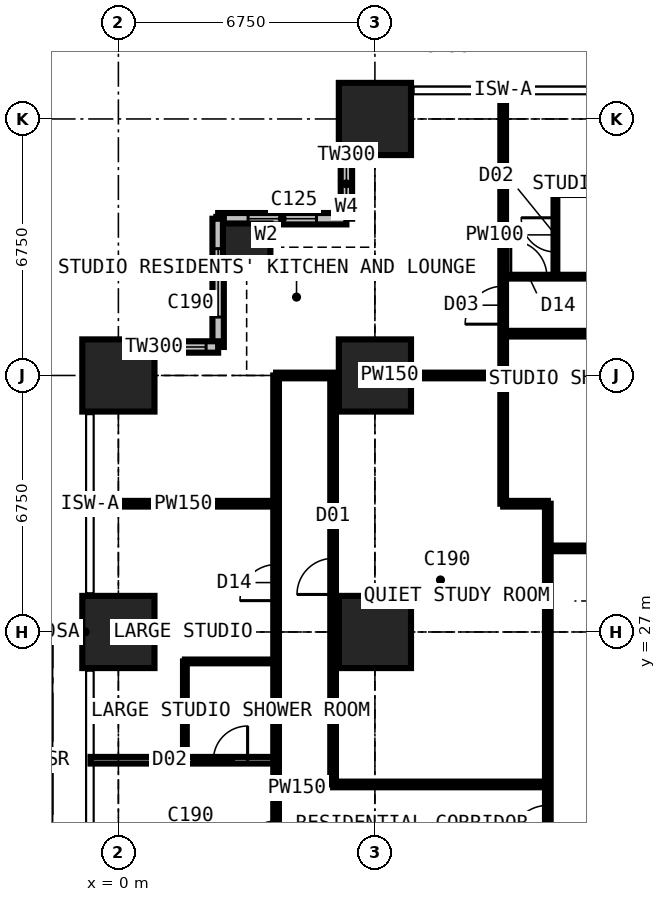
"""IFC4 building model, lengths in metres.
Left out: names, types, materials, properties, quantities, classifications, styles, units other than length and angle.
Written with IfcOpenShell. Run it as: python <this file> out.ifc"""

import sys

from ifc_helpers import new_model, si_unit, direction, frame, frame_2d, origin, origin_2d, place, context, subcontext, project, spatial, rectangle, extrude, element, fill, save


model = new_model("IFC4")
c1 = context("Model", 3, precision=1e-05, world=origin(), true_north=direction((0.0, 1.0)))
c2 = subcontext(c1, "Body", "Model", "MODEL_VIEW")
j1 = project(units=[si_unit("LENGTHUNIT", "METRE"), si_unit("PLANEANGLEUNIT", "RADIAN")], contexts=[c1])
p1 = place(None, origin())
s1 = spatial("IfcSite", under=j1, at=p1, CompositionType="ELEMENT")
p2 = place(p1, origin())
s2 = spatial("IfcBuilding", under=s1, at=p2, CompositionType="ELEMENT")
p3 = place(p2, frame((0.0, 0.0, 18.0)))
s3 = spatial("IfcBuildingStorey", under=s2, at=p3, CompositionType="ELEMENT", Elevation=18.0)
for number, where, z_axis, x_axis in (
    (1, (0.0, 27.0, 0.0), (0.0, 0.0, 1.0), (1.0, 0.0, 0.0)),
    (2, (0.0, 33.75, 0.0), (0.0, 0.0, 1.0), (1.0, 0.0, 0.0)),
):
    element("IfcColumn", number, at=place(p3, frame(where, z_axis=z_axis, x_axis=x_axis)), inside=s3, PredefinedType="COLUMN", context=c2, shape_type="SweptSolid", body=[
        extrude(rectangle(XDim=1.9, YDim=1.9, at=origin_2d()), origin(), (0.0, 0.0, 1.0), 3.6),
    ])
p4 = place(p3, frame((3.375, 37.125, 0.0), z_axis=(0.0, 0.0, 1.0), x_axis=(1.0, 0.0, 0.0)))
e3 = element("IfcColumn", 3, at=p4, inside=s3, PredefinedType="COLUMN", context=c2, shape_type="SweptSolid", body=[
    extrude(rectangle(XDim=1.25, YDim=1.25, at=origin_2d()), origin(), (0.0, 0.0, 1.0), 3.6),
])
for number, where, z_axis, x_axis in (
    (4, (6.75, 27.0, 0.0), (0.0, 0.0, 1.0), (1.0, 0.0, 0.0)),
    (5, (6.75, 33.75, 0.0), (0.0, 0.0, 1.0), (1.0, 0.0, 0.0)),
    (6, (6.75, 40.5, 0.0), (0.0, 0.0, 1.0), (1.0, 0.0, 0.0)),
):
    element("IfcColumn", number, at=place(p3, frame(where, z_axis=z_axis, x_axis=x_axis)), inside=s3, PredefinedType="COLUMN", context=c2, shape_type="SweptSolid", body=[
        extrude(rectangle(XDim=1.9, YDim=1.9, at=origin_2d()), origin(), (0.0, 0.0, 1.0), 3.6),
    ])
p5 = place(p3, frame((6.0, 41.25, 0.0), z_axis=(0.0, 0.0, 1.0), x_axis=(0.0, -1.0, 0.0)))
e7 = element("IfcWall", 7, at=p5, inside=s3, PredefinedType="SOLIDWALL", context=c2, shape_type="SweptSolid", body=[
    extrude(rectangle(XDim=3.375, YDim=0.3, at=frame_2d((1.688, 0.0))), origin(), (0.0, 0.0, 1.0), 3.375),
])
p6 = place(p5, frame((1.857, 0.0, 0.9)))
e8 = element("IfcOpeningElement", 8, at=p6, cuts=e7, PredefinedType="OPENING", context=c2, shape_type="SweptSolid", body=[
    extrude(rectangle(XDim=1.2, YDim=1.8, at=frame_2d((0.6, 0.9))), frame((0.0, 0.16, 0.0), z_axis=(0.0, -1.0, 0.0), x_axis=(1.0, 0.0, 0.0)), (0.0, 0.0, 1.0), 0.32),
])
p7 = place(p3, frame((6.0, 37.875, 0.0), z_axis=(0.0, 0.0, 1.0), x_axis=(-1.0, 0.0, 0.0)))
e9 = element("IfcWall", 9, at=p7, inside=s3, PredefinedType="SOLIDWALL", context=c2, shape_type="SweptSolid", body=[
    extrude(rectangle(XDim=3.375, YDim=0.3, at=frame_2d((1.688, 0.0))), origin(), (0.0, 0.0, 1.0), 3.375),
])
p8 = place(p7, frame((0.788, 0.0, 0.6)))
e10 = element("IfcOpeningElement", 10, at=p8, cuts=e9, PredefinedType="OPENING", context=c2, shape_type="SweptSolid", body=[
    extrude(rectangle(XDim=1.8, YDim=2.1, at=frame_2d((0.9, 1.05))), frame((0.0, 0.16, 0.0), z_axis=(0.0, -1.0, 0.0), x_axis=(1.0, 0.0, 0.0)), (0.0, 0.0, 1.0), 0.32),
])
p9 = place(p3, frame((2.625, 37.875, 0.0), z_axis=(0.0, 0.0, 1.0), x_axis=(0.0, -1.0, 0.0)))
e11 = element("IfcWall", 11, at=p9, inside=s3, PredefinedType="SOLIDWALL", context=c2, shape_type="SweptSolid", body=[
    extrude(rectangle(XDim=3.375, YDim=0.3, at=frame_2d((1.688, 0.0))), origin(), (0.0, 0.0, 1.0), 3.375),
])
p10 = place(p9, frame((0.788, 0.0, 0.6)))
e12 = element("IfcOpeningElement", 12, at=p10, cuts=e11, PredefinedType="OPENING", context=c2, shape_type="SweptSolid", body=[
    extrude(rectangle(XDim=1.8, YDim=2.1, at=frame_2d((0.9, 1.05))), frame((0.0, 0.16, 0.0), z_axis=(0.0, -1.0, 0.0), x_axis=(1.0, 0.0, 0.0)), (0.0, 0.0, 1.0), 0.32),
])
p11 = place(p3, frame((2.625, 34.5, 0.0), z_axis=(0.0, 0.0, 1.0), x_axis=(-1.0, 0.0, 0.0)))
e13 = element("IfcWall", 13, at=p11, inside=s3, PredefinedType="SOLIDWALL", context=c2, shape_type="SweptSolid", body=[
    extrude(rectangle(XDim=3.375, YDim=0.3, at=frame_2d((1.688, 0.0))), origin(), (0.0, 0.0, 1.0), 3.375),
])
p12 = place(p11, frame((0.317, 0.0, 0.9)))
e14 = element("IfcOpeningElement", 14, at=p12, cuts=e13, PredefinedType="OPENING", context=c2, shape_type="SweptSolid", body=[
    extrude(rectangle(XDim=1.2, YDim=1.8, at=frame_2d((0.6, 0.9))), frame((0.0, 0.16, 0.0), z_axis=(0.0, -1.0, 0.0), x_axis=(1.0, 0.0, 0.0)), (0.0, 0.0, 1.0), 0.32),
])
p13 = place(p3, frame((-0.734, 23.625, 0.0), z_axis=(0.0, 0.0, 1.0), x_axis=(1.0, 0.0, 0.0)))
e15 = element("IfcWall", 15, at=p13, inside=s3, PredefinedType="PARTITIONING", context=c2, shape_type="SweptSolid", body=[
    extrude(rectangle(XDim=4.884, YDim=0.175, at=frame_2d((2.442, 0.0))), origin(), (0.0, 0.0, 1.0), 3.375),
])
p14 = place(p13, frame((3.234, 0.0, 0.0)))
e16 = element("IfcOpeningElement", 16, at=p14, cuts=e15, PredefinedType="OPENING", context=c2, shape_type="SweptSolid", body=[
    extrude(rectangle(XDim=0.9, YDim=2.2, at=frame_2d((0.45, 1.1))), frame((0.0, 0.097, 0.0), z_axis=(0.0, -1.0, 0.0), x_axis=(1.0, 0.0, 0.0)), (0.0, 0.0, 1.0), 0.195),
])
p15 = place(p3, frame((-0.734, 30.375, 0.0), z_axis=(0.0, 0.0, 1.0), x_axis=(1.0, 0.0, 0.0)))
e17 = element("IfcWall", 17, at=p15, inside=s3, PredefinedType="PARTITIONING", context=c2, shape_type="SweptSolid", body=[
    extrude(rectangle(XDim=4.884, YDim=0.15, at=frame_2d((2.442, 0.0))), origin(), (0.0, 0.0, 1.0), 3.375),
])
p16 = place(p3, frame((1.75, 23.625, 0.0), z_axis=(0.0, 0.0, 1.0), x_axis=(0.0, 1.0, 0.0)))
e18 = element("IfcWall", 18, at=p16, inside=s3, PredefinedType="PARTITIONING", context=c2, shape_type="SweptSolid", body=[
    extrude(rectangle(XDim=2.6, YDim=0.1, at=frame_2d((1.3, 0.0))), origin(), (0.0, 0.0, 1.0), 3.375),
])
p17 = place(p3, frame((1.75, 26.225, 0.0), z_axis=(0.0, 0.0, 1.0), x_axis=(1.0, 0.0, 0.0)))
e19 = element("IfcWall", 19, at=p17, inside=s3, PredefinedType="PARTITIONING", context=c2, shape_type="SweptSolid", body=[
    extrude(rectangle(XDim=2.4, YDim=0.1, at=frame_2d((1.2, 0.0))), origin(), (0.0, 0.0, 1.0), 3.375),
])
p18 = place(p3, frame((4.15, 10.125, 0.0), z_axis=(0.0, 0.0, 1.0), x_axis=(0.0, 1.0, 0.0)))
e20 = element("IfcWall", 20, at=p18, inside=s3, PredefinedType="PARTITIONING", context=c2, shape_type="SweptSolid", body=[
    extrude(rectangle(XDim=23.625, YDim=0.15, at=frame_2d((11.812, 0.0))), origin(), (0.0, 0.0, 1.0), 3.375),
])
p19 = place(p18, frame((4.2, 0.0, 0.0)))
e21 = element("IfcOpeningElement", 21, at=p19, cuts=e20, PredefinedType="OPENING", context=c2, shape_type="SweptSolid", body=[
    extrude(rectangle(XDim=0.95, YDim=2.2, at=frame_2d((0.475, 1.1))), frame((0.0, 0.085, 0.0), z_axis=(0.0, -1.0, 0.0), x_axis=(1.0, 0.0, 0.0)), (0.0, 0.0, 1.0), 0.17),
])
p20 = place(p18, frame((10.95, 0.0, 0.0)))
e22 = element("IfcOpeningElement", 22, at=p20, cuts=e20, PredefinedType="OPENING", context=c2, shape_type="SweptSolid", body=[
    extrude(rectangle(XDim=0.95, YDim=2.2, at=frame_2d((0.475, 1.1))), frame((0.0, 0.085, 0.0), z_axis=(0.0, -1.0, 0.0), x_axis=(1.0, 0.0, 0.0)), (0.0, 0.0, 1.0), 0.17),
])
p21 = place(p18, frame((17.7, 0.0, 0.0)))
e23 = element("IfcOpeningElement", 23, at=p21, cuts=e20, PredefinedType="OPENING", context=c2, shape_type="SweptSolid", body=[
    extrude(rectangle(XDim=0.95, YDim=2.2, at=frame_2d((0.475, 1.1))), frame((0.0, 0.085, 0.0), z_axis=(0.0, -1.0, 0.0), x_axis=(1.0, 0.0, 0.0)), (0.0, 0.0, 1.0), 0.17),
])
p22 = place(p3, frame((4.15, 33.75, 0.0), z_axis=(0.0, 0.0, 1.0), x_axis=(1.0, 0.0, 0.0)))
e24 = element("IfcWall", 24, at=p22, inside=s3, PredefinedType="PARTITIONING", context=c2, shape_type="SweptSolid", body=[
    extrude(rectangle(XDim=5.975, YDim=0.15, at=frame_2d((2.988, 0.0))), origin(), (0.0, 0.0, 1.0), 2.877),
])
p23 = place(p3, frame((5.65, 22.988, 0.0), z_axis=(0.0, 0.0, 1.0), x_axis=(0.0, 1.0, 0.0)))
e25 = element("IfcWall", 25, at=p23, inside=s3, PredefinedType="PARTITIONING", context=c2, shape_type="SweptSolid", body=[
    extrude(rectangle(XDim=10.762, YDim=0.15, at=frame_2d((5.381, 0.0))), origin(), (0.0, 0.0, 1.0), 3.375),
])
p24 = place(p23, frame((5.0, 0.0, 0.0)))
e26 = element("IfcOpeningElement", 26, at=p24, cuts=e25, PredefinedType="OPENING", context=c2, shape_type="SweptSolid", body=[
    extrude(rectangle(XDim=0.95, YDim=2.2, at=frame_2d((0.475, 1.1))), frame((0.0, 0.085, 0.0), z_axis=(0.0, -1.0, 0.0), x_axis=(1.0, 0.0, 0.0)), (0.0, 0.0, 1.0), 0.17),
])
p25 = place(p3, frame((5.65, 22.988, 0.0), z_axis=(0.0, 0.0, 1.0), x_axis=(1.0, 0.0, 0.0)))
e27 = element("IfcWall", 27, at=p25, inside=s3, PredefinedType="PARTITIONING", context=c2, shape_type="SweptSolid", body=[
    extrude(rectangle(XDim=5.65, YDim=0.15, at=frame_2d((2.825, 0.0))), origin(), (0.0, 0.0, 1.0), 3.375),
])
p26 = place(p3, frame((10.125, 30.375, 0.0), z_axis=(0.0, 0.0, 1.0), x_axis=(0.0, 1.0, 0.0)))
e28 = element("IfcWall", 28, at=p26, inside=s3, PredefinedType="PARTITIONING", context=c2, shape_type="SweptSolid", body=[
    extrude(rectangle(XDim=10.859, YDim=0.15, at=frame_2d((5.429, 0.0))), origin(), (0.0, 0.0, 1.0), 3.375),
])
p27 = place(p26, frame((4.725, 0.0, 0.0)))
e29 = element("IfcOpeningElement", 29, at=p27, cuts=e28, PredefinedType="OPENING", context=c2, shape_type="SweptSolid", body=[
    extrude(rectangle(XDim=1.0, YDim=2.2, at=frame_2d((0.5, 1.1))), frame((0.0, 0.085, 0.0), z_axis=(0.0, -1.0, 0.0), x_axis=(1.0, 0.0, 0.0)), (0.0, 0.0, 1.0), 0.17),
])
p28 = place(p3, frame((10.125, 30.375, 0.0), z_axis=(0.0, 0.0, 1.0), x_axis=(1.0, 0.0, 0.0)))
e30 = element("IfcWall", 30, at=p28, inside=s3, PredefinedType="PARTITIONING", context=c2, shape_type="SweptSolid", body=[
    extrude(rectangle(XDim=1.175, YDim=0.15, at=frame_2d((0.587, 0.0))), origin(), (0.0, 0.0, 1.0), 3.375),
])
p29 = place(p3, frame((10.125, 34.85, 0.0), z_axis=(0.0, 0.0, 1.0), x_axis=(1.0, 0.0, 0.0)))
e31 = element("IfcWall", 31, at=p29, inside=s3, PredefinedType="PARTITIONING", context=c2, shape_type="SweptSolid", body=[
    extrude(rectangle(XDim=10.762, YDim=0.15, at=frame_2d((5.381, 0.0))), origin(), (0.0, 0.0, 1.0), 3.375),
])
p30 = place(p29, frame((4.9, 0.0, 0.0)))
e32 = element("IfcOpeningElement", 32, at=p30, cuts=e31, PredefinedType="OPENING", context=c2, shape_type="SweptSolid", body=[
    extrude(rectangle(XDim=0.95, YDim=2.2, at=frame_2d((0.475, 1.1))), frame((0.0, 0.085, 0.0), z_axis=(0.0, -1.0, 0.0), x_axis=(1.0, 0.0, 0.0)), (0.0, 0.0, 1.0), 0.17),
])
p31 = place(p3, frame((10.125, 36.35, 0.0), z_axis=(0.0, 0.0, 1.0), x_axis=(1.0, 0.0, 0.0)))
e33 = element("IfcWall", 33, at=p31, inside=s3, PredefinedType="PARTITIONING", context=c2, shape_type="SweptSolid", body=[
    extrude(rectangle(XDim=23.625, YDim=0.1, at=frame_2d((11.812, 0.0))), origin(), (0.0, 0.0, 1.0), 3.375),
])
p32 = place(p31, frame((0.2, 0.0, 0.0)))
e34 = element("IfcOpeningElement", 34, at=p32, cuts=e33, PredefinedType="OPENING", context=c2, shape_type="SweptSolid", body=[
    extrude(rectangle(XDim=0.95, YDim=2.2, at=frame_2d((0.475, 1.1))), frame((0.0, 0.06, 0.0), z_axis=(0.0, -1.0, 0.0), x_axis=(1.0, 0.0, 0.0)), (0.0, 0.0, 1.0), 0.12),
])
p33 = place(p31, frame((3.625, 0.0, 0.0)))
e35 = element("IfcOpeningElement", 35, at=p33, cuts=e33, PredefinedType="OPENING", context=c2, shape_type="SweptSolid", body=[
    extrude(rectangle(XDim=0.95, YDim=2.2, at=frame_2d((0.475, 1.1))), frame((0.0, 0.06, 0.0), z_axis=(0.0, -1.0, 0.0), x_axis=(1.0, 0.0, 0.0)), (0.0, 0.0, 1.0), 0.12),
])
p34 = place(p31, frame((7.0, 0.0, 0.0)))
e36 = element("IfcOpeningElement", 36, at=p34, cuts=e33, PredefinedType="OPENING", context=c2, shape_type="SweptSolid", body=[
    extrude(rectangle(XDim=0.95, YDim=2.2, at=frame_2d((0.475, 1.1))), frame((0.0, 0.06, 0.0), z_axis=(0.0, -1.0, 0.0), x_axis=(1.0, 0.0, 0.0)), (0.0, 0.0, 1.0), 0.12),
])
p35 = place(p31, frame((10.375, 0.0, 0.0)))
e37 = element("IfcOpeningElement", 37, at=p35, cuts=e33, PredefinedType="OPENING", context=c2, shape_type="SweptSolid", body=[
    extrude(rectangle(XDim=0.95, YDim=2.2, at=frame_2d((0.475, 1.1))), frame((0.0, 0.06, 0.0), z_axis=(0.0, -1.0, 0.0), x_axis=(1.0, 0.0, 0.0)), (0.0, 0.0, 1.0), 0.12),
])
p36 = place(p31, frame((13.75, 0.0, 0.0)))
e38 = element("IfcOpeningElement", 38, at=p36, cuts=e33, PredefinedType="OPENING", context=c2, shape_type="SweptSolid", body=[
    extrude(rectangle(XDim=0.95, YDim=2.2, at=frame_2d((0.475, 1.1))), frame((0.0, 0.06, 0.0), z_axis=(0.0, -1.0, 0.0), x_axis=(1.0, 0.0, 0.0)), (0.0, 0.0, 1.0), 0.12),
])
p37 = place(p3, frame((11.3, 11.3, 0.0), z_axis=(0.0, 0.0, 1.0), x_axis=(0.0, 1.0, 0.0)))
e39 = element("IfcWall", 39, at=p37, inside=s3, PredefinedType="PARTITIONING", context=c2, shape_type="SweptSolid", body=[
    extrude(rectangle(XDim=19.075, YDim=0.15, at=frame_2d((9.538, 0.0))), origin(), (0.0, 0.0, 1.0), 3.375),
])
p38 = place(p37, frame((10.137, 0.0, 0.0)))
e40 = element("IfcOpeningElement", 40, at=p38, cuts=e39, PredefinedType="OPENING", context=c2, shape_type="SweptSolid", body=[
    extrude(rectangle(XDim=1.0, YDim=2.2, at=frame_2d((0.5, 1.1))), frame((0.0, 0.085, 0.0), z_axis=(0.0, -1.0, 0.0), x_axis=(1.0, 0.0, 0.0)), (0.0, 0.0, 1.0), 0.17),
])
p39 = place(p3, frame((11.3, 29.2, 0.0), z_axis=(0.0, 0.0, 1.0), x_axis=(1.0, 0.0, 0.0)))
e41 = element("IfcWall", 41, at=p39, inside=s3, PredefinedType="PARTITIONING", context=c2, shape_type="SweptSolid", body=[
    extrude(rectangle(XDim=19.075, YDim=0.15, at=frame_2d((9.538, 0.0))), origin(), (0.0, 0.0, 1.0), 3.375),
])
p40 = place(p39, frame((10.137, 0.0, 0.0)))
e42 = element("IfcOpeningElement", 42, at=p40, cuts=e41, PredefinedType="OPENING", context=c2, shape_type="SweptSolid", body=[
    extrude(rectangle(XDim=1.0, YDim=2.2, at=frame_2d((0.5, 1.1))), frame((0.0, 0.085, 0.0), z_axis=(0.0, -1.0, 0.0), x_axis=(1.0, 0.0, 0.0)), (0.0, 0.0, 1.0), 0.17),
])
p41 = place(p3, frame((11.5, 36.35, 0.0), z_axis=(0.0, 0.0, 1.0), x_axis=(0.0, 1.0, 0.0)))
e43 = element("IfcWall", 43, at=p41, inside=s3, PredefinedType="PARTITIONING", context=c2, shape_type="SweptSolid", body=[
    extrude(rectangle(XDim=2.2, YDim=0.1, at=frame_2d((1.1, 0.0))), origin(), (0.0, 0.0, 1.0), 3.375),
])
p42 = place(p41, frame((0.65, 0.0, 0.0)))
e44 = element("IfcOpeningElement", 44, at=p42, cuts=e43, PredefinedType="OPENING", context=c2, shape_type="SweptSolid", body=[
    extrude(rectangle(XDim=0.9, YDim=2.2, at=frame_2d((0.45, 1.1))), frame((0.0, 0.06, 0.0), z_axis=(0.0, -1.0, 0.0), x_axis=(1.0, 0.0, 0.0)), (0.0, 0.0, 1.0), 0.12),
])
p43 = place(p3, frame((11.5, 38.55, 0.0), z_axis=(0.0, 0.0, 1.0), x_axis=(1.0, 0.0, 0.0)))
e45 = element("IfcWall", 45, at=p43, inside=s3, PredefinedType="PARTITIONING", context=c2, shape_type="SweptSolid", body=[
    extrude(rectangle(XDim=2.0, YDim=0.1, at=frame_2d((1.0, 0.0))), origin(), (0.0, 0.0, 1.0), 3.375),
])
p44 = place(p6, origin())
e46 = element("IfcWindow", 46, at=p44, inside=s3, PartitioningType="SINGLE_PANEL", PredefinedType="WINDOW", context=c2, shape_type="SweptSolid", body=[
    extrude(rectangle(XDim=1.2, YDim=1.8, at=frame_2d((0.6, 0.9))), frame((0.0, 0.03, 0.0), z_axis=(0.0, -1.0, 0.0), x_axis=(1.0, 0.0, 0.0)), (0.0, 0.0, 1.0), 0.06),
])
fill(e8, e46)
p45 = place(p8, origin())
e47 = element("IfcWindow", 47, at=p45, inside=s3, PartitioningType="SINGLE_PANEL", PredefinedType="WINDOW", context=c2, shape_type="SweptSolid", body=[
    extrude(rectangle(XDim=1.8, YDim=2.1, at=frame_2d((0.9, 1.05))), frame((0.0, 0.03, 0.0), z_axis=(0.0, -1.0, 0.0), x_axis=(1.0, 0.0, 0.0)), (0.0, 0.0, 1.0), 0.06),
])
fill(e10, e47)
p46 = place(p10, origin())
e48 = element("IfcWindow", 48, at=p46, inside=s3, PartitioningType="SINGLE_PANEL", PredefinedType="WINDOW", context=c2, shape_type="SweptSolid", body=[
    extrude(rectangle(XDim=1.8, YDim=2.1, at=frame_2d((0.9, 1.05))), frame((0.0, 0.03, 0.0), z_axis=(0.0, -1.0, 0.0), x_axis=(1.0, 0.0, 0.0)), (0.0, 0.0, 1.0), 0.06),
])
fill(e12, e48)
p47 = place(p12, origin())
e49 = element("IfcWindow", 49, at=p47, inside=s3, PartitioningType="SINGLE_PANEL", PredefinedType="WINDOW", context=c2, shape_type="SweptSolid", body=[
    extrude(rectangle(XDim=1.2, YDim=1.8, at=frame_2d((0.6, 0.9))), frame((0.0, 0.03, 0.0), z_axis=(0.0, -1.0, 0.0), x_axis=(1.0, 0.0, 0.0)), (0.0, 0.0, 1.0), 0.06),
])
fill(e14, e49)
p48 = place(p32, origin())
e50 = element("IfcDoor", 50, at=p48, inside=s3, OperationType="SINGLE_SWING_LEFT", PredefinedType="DOOR", context=c2, shape_type="SweptSolid", body=[
    extrude(rectangle(XDim=0.95, YDim=2.2, at=frame_2d((0.475, 1.1))), frame((0.0, 0.025, 0.0), z_axis=(0.0, -1.0, 0.0), x_axis=(1.0, 0.0, 0.0)), (0.0, 0.0, 1.0), 0.05),
])
fill(e34, e50)
p49 = place(p42, origin())
e51 = element("IfcDoor", 51, at=p49, inside=s3, OperationType="SINGLE_SWING_RIGHT", PredefinedType="DOOR", context=c2, shape_type="SweptSolid", body=[
    extrude(rectangle(XDim=0.9, YDim=2.2, at=frame_2d((0.45, 1.1))), frame((0.0, 0.025, 0.0), z_axis=(0.0, -1.0, 0.0), x_axis=(1.0, 0.0, 0.0)), (0.0, 0.0, 1.0), 0.05),
])
fill(e44, e51)
p50 = place(p27, origin())
e52 = element("IfcDoor", 52, at=p50, inside=s3, OperationType="SINGLE_SWING_LEFT", PredefinedType="DOOR", context=c2, shape_type="SweptSolid", body=[
    extrude(rectangle(XDim=1.0, YDim=2.2, at=frame_2d((0.5, 1.1))), frame((0.0, 0.025, 0.0), z_axis=(0.0, -1.0, 0.0), x_axis=(1.0, 0.0, 0.0)), (0.0, 0.0, 1.0), 0.05),
])
fill(e29, e52)
p51 = place(p20, origin())
e53 = element("IfcDoor", 53, at=p51, inside=s3, OperationType="SINGLE_SWING_LEFT", PredefinedType="DOOR", context=c2, shape_type="SweptSolid", body=[
    extrude(rectangle(XDim=0.95, YDim=2.2, at=frame_2d((0.475, 1.1))), frame((0.0, 0.025, 0.0), z_axis=(0.0, -1.0, 0.0), x_axis=(1.0, 0.0, 0.0)), (0.0, 0.0, 1.0), 0.05),
])
fill(e22, e53)
p52 = place(p21, origin())
e54 = element("IfcDoor", 54, at=p52, inside=s3, OperationType="SINGLE_SWING_LEFT", PredefinedType="DOOR", context=c2, shape_type="SweptSolid", body=[
    extrude(rectangle(XDim=0.95, YDim=2.2, at=frame_2d((0.475, 1.1))), frame((0.0, 0.025, 0.0), z_axis=(0.0, -1.0, 0.0), x_axis=(1.0, 0.0, 0.0)), (0.0, 0.0, 1.0), 0.05),
])
fill(e23, e54)
p53 = place(p14, origin())
e55 = element("IfcDoor", 55, at=p53, inside=s3, OperationType="SINGLE_SWING_RIGHT", PredefinedType="DOOR", context=c2, shape_type="SweptSolid", body=[
    extrude(rectangle(XDim=0.9, YDim=2.2, at=frame_2d((0.45, 1.1))), frame((0.0, 0.025, 0.0), z_axis=(0.0, -1.0, 0.0), x_axis=(1.0, 0.0, 0.0)), (0.0, 0.0, 1.0), 0.05),
])
fill(e16, e55)
p54 = place(p38, origin())
e56 = element("IfcDoor", 56, at=p54, inside=s3, OperationType="SINGLE_SWING_LEFT", PredefinedType="DOOR", context=c2, shape_type="SweptSolid", body=[
    extrude(rectangle(XDim=1.0, YDim=2.2, at=frame_2d((0.5, 1.1))), frame((0.0, 0.025, 0.0), z_axis=(0.0, -1.0, 0.0), x_axis=(1.0, 0.0, 0.0)), (0.0, 0.0, 1.0), 0.05),
])
fill(e40, e56)
p55 = place(p24, origin())
e57 = element("IfcDoor", 57, at=p55, inside=s3, OperationType="SINGLE_SWING_LEFT", PredefinedType="DOOR", context=c2, shape_type="SweptSolid", body=[
    extrude(rectangle(XDim=0.95, YDim=2.2, at=frame_2d((0.475, 1.1))), frame((0.0, 0.025, 0.0), z_axis=(0.0, -1.0, 0.0), x_axis=(1.0, 0.0, 0.0)), (0.0, 0.0, 1.0), 0.05),
])
fill(e26, e57)
save(model, sys.argv[1])
